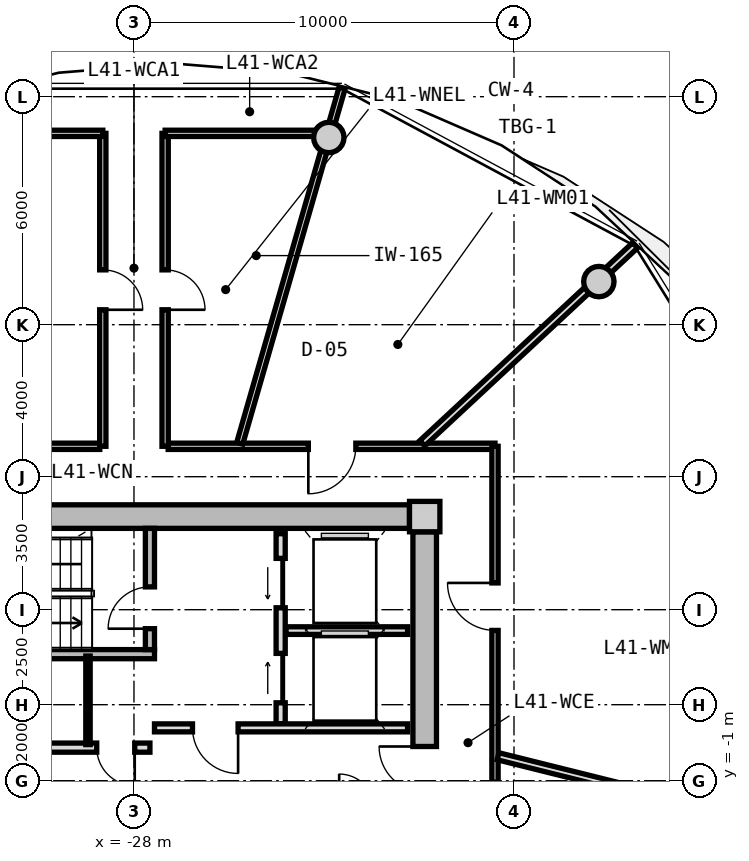
"""IFC4 building model, lengths in metres.
Left out: names, types, materials, properties, quantities, classifications, styles, units other than length and angle.
Written with IfcOpenShell. Run it as: python <this file> out.ifc"""

import sys

from ifc_helpers import new_model, si_unit, direction, frame, frame_2d, origin, origin_2d, place, context, subcontext, project, spatial, rectangle, circle, extrude, source, transform, mapped, element, fill, save


model = new_model("IFC4")
c1 = context("Model", 3, precision=1e-05, world=origin(), true_north=direction((0.0, 1.0)))
c2 = subcontext(c1, "Body", "Model", "MODEL_VIEW")
j1 = project(units=[si_unit("LENGTHUNIT", "METRE"), si_unit("PLANEANGLEUNIT", "RADIAN")], contexts=[c1])
p1 = place(None, origin())
s1 = spatial("IfcSite", under=j1, at=p1, CompositionType="ELEMENT")
p2 = place(p1, origin())
s2 = spatial("IfcBuilding", under=s1, at=p2, CompositionType="ELEMENT")
p3 = place(p2, frame((0.0, 0.0, 134.3)))
s3 = spatial("IfcBuildingStorey", under=s2, at=p3, CompositionType="ELEMENT", Elevation=134.3)
m1 = source(origin(), c2, "Body", "SweptSolid", [
    extrude(rectangle(XDim=0.8, YDim=0.8, at=origin_2d()), origin(), (0.0, 0.0, 1.0), 3.05),
])
p4 = place(p3, frame((-20.35, 5.95, 0.0), z_axis=(0.0, 0.0, 1.0), x_axis=(1.0, 0.0, 0.0)))
e1 = element("IfcColumn", 1, at=p4, inside=s3, PredefinedType="COLUMN", context=c2, shape_type="MappedRepresentation", body=[
    mapped(m1, transform((0.0, 0.0, 0.0), x_axis=(1.0, 0.0, 0.0), y_axis=(0.0, 1.0, 0.0), z_axis=(0.0, 0.0, 1.0), scale=1.0)),
])
m2 = source(origin(), c2, "Body", "SweptSolid", [
    extrude(rectangle(XDim=14.5, YDim=0.62, at=frame_2d((7.25, 0.0))), origin(), (0.0, 0.0, 1.0), 2.81),
])
p5 = place(p3, frame((-35.25, 5.95, 0.0), z_axis=(0.0, 0.0, 1.0), x_axis=(1.0, 0.0, 0.0)))
e2 = element("IfcWall", 2, at=p5, inside=s3, PredefinedType="SHEAR", context=c2, shape_type="MappedRepresentation", body=[
    mapped(m2, transform((0.0, 0.0, 0.0), x_axis=(1.0, 0.0, 0.0), y_axis=(0.0, 1.0, 0.0), z_axis=(0.0, 0.0, 1.0), scale=1.0)),
])
m3 = source(origin(), c2, "Body", "SweptSolid", [
    extrude(rectangle(XDim=11.1, YDim=0.62, at=frame_2d((5.55, 0.0))), origin(), (0.0, 0.0, 1.0), 2.81),
])
p6 = place(p3, frame((-20.35, 5.55, 0.0), z_axis=(0.0, 0.0, 1.0), x_axis=(0.0, -1.0, 0.0)))
e3 = element("IfcWall", 3, at=p6, inside=s3, PredefinedType="SHEAR", context=c2, shape_type="MappedRepresentation", body=[
    mapped(m3, transform((0.0, 0.0, 0.0), x_axis=(1.0, 0.0, 0.0), y_axis=(0.0, 1.0, 0.0), z_axis=(0.0, 0.0, 1.0), scale=1.0)),
])
p7 = place(p6, frame((5.65, 0.0, 0.0)))
e4 = element("IfcOpeningElement", 4, at=p7, cuts=e3, PredefinedType="OPENING", context=c2, shape_type="SweptSolid", body=[
    extrude(rectangle(XDim=1.2, YDim=2.15, at=frame_2d((0.6, 1.075))), frame((0.0, 0.32, 0.0), z_axis=(0.0, -1.0, 0.0), x_axis=(1.0, 0.0, 0.0)), (0.0, 0.0, 1.0), 0.64),
])
p8 = place(p6, frame((9.3, 0.0, 0.0)))
e5 = element("IfcOpeningElement", 5, at=p8, cuts=e3, PredefinedType="OPENING", context=c2, shape_type="SweptSolid", body=[
    extrude(rectangle(XDim=1.0, YDim=2.1, at=frame_2d((0.5, 1.05))), frame((0.0, 0.32, 0.0), z_axis=(0.0, -1.0, 0.0), x_axis=(1.0, 0.0, 0.0)), (0.0, 0.0, 1.0), 0.64),
])
m4 = source(origin(), c2, "Body", "SweptSolid", [
    extrude(circle(Radius=0.4, at=origin_2d()), origin(), (0.0, 0.0, 1.0), 3.47),
])
for number, where, z_axis, x_axis in (
    (6, (-15.767, 12.135, -0.42), (0.0, 0.0, 1.0), (1.0, 0.0, 0.0)),
    (7, (-22.873, 15.926, -0.42), (0.0, 0.0, 1.0), (1.0, 0.0, 0.0)),
):
    element("IfcColumn", number, at=place(p3, frame(where, z_axis=z_axis, x_axis=x_axis)), inside=s3, PredefinedType="COLUMN", context=c2, shape_type="MappedRepresentation", body=[
        mapped(m4, transform((0.0, 0.0, 0.0), x_axis=(1.0, 0.0, 0.0), y_axis=(0.0, 1.0, 0.0), z_axis=(0.0, 0.0, 1.0), scale=1.0)),
    ])
m5 = source(origin(), c2, "Body", "SweptSolid", [
    extrude(rectangle(XDim=7.88, YDim=0.24, at=frame_2d((3.94, 0.0))), origin(), (0.0, 0.0, 1.0), 2.81),
])
p9 = place(p3, frame((-35.34, 2.33, 0.0), z_axis=(0.0, 0.0, 1.0), x_axis=(1.0, 0.0, 0.0)))
e8 = element("IfcWall", 8, at=p9, inside=s3, PredefinedType="PARTITIONING", context=c2, shape_type="MappedRepresentation", body=[
    mapped(m5, transform((0.0, 0.0, 0.0), x_axis=(1.0, 0.0, 0.0), y_axis=(0.0, 1.0, 0.0), z_axis=(0.0, 0.0, 1.0), scale=1.0)),
])
m6 = source(origin(), c2, "Body", "SweptSolid", [
    extrude(rectangle(XDim=3.19, YDim=0.24, at=frame_2d((1.595, 0.0))), origin(), (0.0, 0.0, 1.0), 2.81),
])
p10 = place(p3, frame((-27.58, 2.45, 0.0), z_axis=(0.0, 0.0, 1.0), x_axis=(0.0, 1.0, 0.0)))
e9 = element("IfcWall", 9, at=p10, inside=s3, PredefinedType="PARTITIONING", context=c2, shape_type="MappedRepresentation", body=[
    mapped(m6, transform((0.0, 0.0, 0.0), x_axis=(1.0, 0.0, 0.0), y_axis=(0.0, 1.0, 0.0), z_axis=(0.0, 0.0, 1.0), scale=1.0)),
])
p11 = place(p10, frame((0.55, 0.0, 0.0)))
e10 = element("IfcOpeningElement", 10, at=p11, cuts=e9, PredefinedType="OPENING", context=c2, shape_type="SweptSolid", body=[
    extrude(rectangle(XDim=1.1, YDim=2.15, at=frame_2d((0.55, 1.075))), frame((0.0, 0.13, 0.0), z_axis=(0.0, -1.0, 0.0), x_axis=(1.0, 0.0, 0.0)), (0.0, 0.0, 1.0), 0.26),
])
m7 = source(origin(), c2, "Body", "SweptSolid", [
    extrude(rectangle(XDim=5.0, YDim=0.24, at=frame_2d((2.5, 0.0))), origin(), (0.0, 0.0, 1.0), 2.795),
])
p12 = place(p3, frame((-24.14, 0.5, 0.0), z_axis=(0.0, 0.0, 1.0), x_axis=(0.0, 1.0, 0.0)))
e11 = element("IfcWall", 11, at=p12, inside=s3, PredefinedType="PARTITIONING", context=c2, shape_type="MappedRepresentation", body=[
    mapped(m7, transform((0.0, 0.0, 0.0), x_axis=(1.0, 0.0, 0.0), y_axis=(0.0, 1.0, 0.0), z_axis=(0.0, 0.0, 1.0), scale=1.0)),
])
p13 = place(p12, frame((3.05, 0.0, 0.0)))
e12 = element("IfcOpeningElement", 12, at=p13, cuts=e11, PredefinedType="OPENING", context=c2, shape_type="SweptSolid", body=[
    extrude(rectangle(XDim=1.3, YDim=2.2, at=frame_2d((0.65, 1.1))), frame((0.0, 0.13, 0.0), z_axis=(0.0, -1.0, 0.0), x_axis=(1.0, 0.0, 0.0)), (0.0, 0.0, 1.0), 0.26),
])
p14 = place(p12, frame((0.55, 0.0, 0.0)))
e13 = element("IfcOpeningElement", 13, at=p14, cuts=e11, PredefinedType="OPENING", context=c2, shape_type="SweptSolid", body=[
    extrude(rectangle(XDim=1.3, YDim=2.2, at=frame_2d((0.65, 1.1))), frame((0.0, 0.13, 0.0), z_axis=(0.0, -1.0, 0.0), x_axis=(1.0, 0.0, 0.0)), (0.0, 0.0, 1.0), 0.26),
])
m8 = source(origin(), c2, "Body", "SweptSolid", [
    extrude(rectangle(XDim=3.2, YDim=0.2, at=frame_2d((1.6, 0.0))), origin(), (0.0, 0.0, 1.0), 2.795),
])
p15 = place(p3, frame((-24.0, 2.95, 0.0), z_axis=(0.0, 0.0, 1.0), x_axis=(1.0, 0.0, 0.0)))
e14 = element("IfcWall", 14, at=p15, inside=s3, PredefinedType="PARTITIONING", context=c2, shape_type="MappedRepresentation", body=[
    mapped(m8, transform((0.0, 0.0, 0.0), x_axis=(1.0, 0.0, 0.0), y_axis=(0.0, 1.0, 0.0), z_axis=(0.0, 0.0, 1.0), scale=1.0)),
])
m9 = source(origin(), c2, "Body", "SweptSolid", [
    extrude(rectangle(XDim=6.66, YDim=0.21, at=frame_2d((3.33, 0.0))), origin(), (0.0, 0.0, 1.0), 2.795),
])
p16 = place(p3, frame((-27.46, 0.39, 0.0), z_axis=(0.0, 0.0, 1.0), x_axis=(1.0, 0.0, 0.0)))
e15 = element("IfcWall", 15, at=p16, inside=s3, PredefinedType="PARTITIONING", context=c2, shape_type="MappedRepresentation", body=[
    mapped(m9, transform((0.0, 0.0, 0.0), x_axis=(1.0, 0.0, 0.0), y_axis=(0.0, 1.0, 0.0), z_axis=(0.0, 0.0, 1.0), scale=1.0)),
])
p17 = place(p16, frame((1.0, 0.0, 0.0)))
e16 = element("IfcOpeningElement", 16, at=p17, cuts=e15, PredefinedType="OPENING", context=c2, shape_type="SweptSolid", body=[
    extrude(rectangle(XDim=1.2, YDim=2.15, at=frame_2d((0.6, 1.075))), frame((0.0, 0.115, 0.0), z_axis=(0.0, -1.0, 0.0), x_axis=(1.0, 0.0, 0.0)), (0.0, 0.0, 1.0), 0.23),
])
m10 = source(origin(), c2, "Body", "SweptSolid", [
    extrude(rectangle(XDim=7.62, YDim=0.24, at=frame_2d((3.81, 0.0))), origin(), (0.0, 0.0, 1.0), 2.795),
])
p18 = place(p3, frame((-35.2, -0.13, 0.0), z_axis=(0.0, 0.0, 1.0), x_axis=(1.0, 0.0, 0.0)))
e17 = element("IfcWall", 17, at=p18, inside=s3, PredefinedType="PARTITIONING", context=c2, shape_type="MappedRepresentation", body=[
    mapped(m10, transform((0.0, 0.0, 0.0), x_axis=(1.0, 0.0, 0.0), y_axis=(0.0, 1.0, 0.0), z_axis=(0.0, 0.0, 1.0), scale=1.0)),
])
p19 = place(p18, frame((6.22, 0.0, 0.0)))
e18 = element("IfcOpeningElement", 18, at=p19, cuts=e17, PredefinedType="OPENING", context=c2, shape_type="SweptSolid", body=[
    extrude(rectangle(XDim=1.0, YDim=2.1, at=frame_2d((0.5, 1.05))), frame((0.0, 0.13, 0.0), z_axis=(0.0, -1.0, 0.0), x_axis=(1.0, 0.0, 0.0)), (0.0, 0.0, 1.0), 0.26),
])
p20 = place(p18, frame((2.4, 0.0, 0.0)))
e19 = element("IfcOpeningElement", 19, at=p20, cuts=e17, PredefinedType="OPENING", context=c2, shape_type="SweptSolid", body=[
    extrude(rectangle(XDim=1.0, YDim=2.1, at=frame_2d((0.5, 1.05))), frame((0.0, 0.13, 0.0), z_axis=(0.0, -1.0, 0.0), x_axis=(1.0, 0.0, 0.0)), (0.0, 0.0, 1.0), 0.26),
])
m11 = source(origin(), c2, "Body", "SweptSolid", [
    extrude(rectangle(XDim=2.33, YDim=0.115, at=frame_2d((1.165, 0.0))), origin(), (0.0, 0.0, 1.0), 2.795),
])
p21 = place(p3, frame((-29.21, -0.05, 0.0), z_axis=(0.0, 0.0, 1.0), x_axis=(0.0, 1.0, 0.0)))
e20 = element("IfcWall", 20, at=p21, inside=s3, PredefinedType="PARTITIONING", context=c2, shape_type="MappedRepresentation", body=[
    mapped(m11, transform((0.0, 0.0, 0.0), x_axis=(1.0, 0.0, 0.0), y_axis=(0.0, 1.0, 0.0), z_axis=(0.0, 0.0, 1.0), scale=1.0)),
])
m12 = source(origin(), c2, "Body", "SweptSolid", [
    extrude(rectangle(XDim=8.6, YDim=0.165, at=frame_2d((4.3, 0.0))), origin(), (0.0, 0.0, 1.0), 2.795),
])
p22 = place(p3, frame((-37.5, 7.8, 0.0), z_axis=(0.0, 0.0, 1.0), x_axis=(1.0, 0.0, 0.0)))
e21 = element("IfcWall", 21, at=p22, inside=s3, PredefinedType="PARTITIONING", context=c2, shape_type="MappedRepresentation", body=[
    mapped(m12, transform((0.0, 0.0, 0.0), x_axis=(1.0, 0.0, 0.0), y_axis=(0.0, 1.0, 0.0), z_axis=(0.0, 0.0, 1.0), scale=1.0)),
])
p23 = place(p22, frame((1.471, 0.0, 0.0)))
e22 = element("IfcOpeningElement", 22, at=p23, cuts=e21, PredefinedType="OPENING", context=c2, shape_type="SweptSolid", body=[
    extrude(rectangle(XDim=1.25, YDim=2.2, at=frame_2d((0.625, 1.1))), frame((0.0, 0.093, 0.0), z_axis=(0.0, -1.0, 0.0), x_axis=(1.0, 0.0, 0.0)), (0.0, 0.0, 1.0), 0.185),
])
p24 = place(p3, frame((-27.1, 7.8, 0.0), z_axis=(0.0, 0.0, 1.0), x_axis=(1.0, 0.0, 0.0)))
e23 = element("IfcWall", 23, at=p24, inside=s3, PredefinedType="PARTITIONING", context=c2, shape_type="MappedRepresentation", body=[
    mapped(m12, transform((0.0, 0.0, 0.0), x_axis=(1.0, 0.0, 0.0), y_axis=(0.0, 1.0, 0.0), z_axis=(0.0, 0.0, 1.0), scale=1.0)),
])
p25 = place(p24, frame((3.688, 0.0, 0.0)))
e24 = element("IfcOpeningElement", 24, at=p25, cuts=e23, PredefinedType="OPENING", context=c2, shape_type="SweptSolid", body=[
    extrude(rectangle(XDim=1.25, YDim=2.2, at=frame_2d((0.625, 1.1))), frame((0.0, 0.093, 0.0), z_axis=(0.0, -1.0, 0.0), x_axis=(1.0, 0.0, 0.0)), (0.0, 0.0, 1.0), 0.185),
])
m13 = source(origin(), c2, "Body", "SweptSolid", [
    extrude(rectangle(XDim=15.6, YDim=0.165, at=frame_2d((7.8, 0.0))), origin(), (0.0, 0.0, 1.0), 2.795),
])
p26 = place(p3, frame((-18.5, 7.8, 0.0), z_axis=(0.0, 0.0, 1.0), x_axis=(0.0, -1.0, 0.0)))
e25 = element("IfcWall", 25, at=p26, inside=s3, PredefinedType="PARTITIONING", context=c2, shape_type="MappedRepresentation", body=[
    mapped(m13, transform((0.0, 0.0, 0.0), x_axis=(1.0, 0.0, 0.0), y_axis=(0.0, 1.0, 0.0), z_axis=(0.0, 0.0, 1.0), scale=1.0)),
])
p27 = place(p26, frame((10.881, 0.0, 0.0)))
e26 = element("IfcOpeningElement", 26, at=p27, cuts=e25, PredefinedType="OPENING", context=c2, shape_type="SweptSolid", body=[
    extrude(rectangle(XDim=1.05, YDim=2.15, at=frame_2d((0.525, 1.075))), frame((0.0, 0.093, 0.0), z_axis=(0.0, -1.0, 0.0), x_axis=(1.0, 0.0, 0.0)), (0.0, 0.0, 1.0), 0.185),
])
p28 = place(p26, frame((8.844, 0.0, 0.0)))
e27 = element("IfcOpeningElement", 27, at=p28, cuts=e25, PredefinedType="OPENING", context=c2, shape_type="SweptSolid", body=[
    extrude(rectangle(XDim=1.05, YDim=2.15, at=frame_2d((0.525, 1.075))), frame((0.0, 0.093, 0.0), z_axis=(0.0, -1.0, 0.0), x_axis=(1.0, 0.0, 0.0)), (0.0, 0.0, 1.0), 0.185),
])
p29 = place(p26, frame((3.596, 0.0, 0.0)))
e28 = element("IfcOpeningElement", 28, at=p29, cuts=e25, PredefinedType="OPENING", context=c2, shape_type="SweptSolid", body=[
    extrude(rectangle(XDim=1.25, YDim=2.2, at=frame_2d((0.625, 1.1))), frame((0.0, 0.093, 0.0), z_axis=(0.0, -1.0, 0.0), x_axis=(1.0, 0.0, 0.0)), (0.0, 0.0, 1.0), 0.185),
])
m14 = source(origin(), c2, "Body", "SweptSolid", [
    extrude(rectangle(XDim=9.73, YDim=0.165, at=frame_2d((4.865, 0.0))), origin(), (0.0, 0.0, 1.0), 2.345),
])
p30 = place(p3, frame((-25.217, 7.88, 0.0), z_axis=(0.0, 0.0, 1.0), x_axis=(0.27679492614, 0.960929013436, 0.0)))
e29 = element("IfcWall", 29, at=p30, inside=s3, PredefinedType="PARTITIONING", context=c2, shape_type="MappedRepresentation", body=[
    mapped(m14, transform((0.0, 0.0, 0.0), x_axis=(1.0, 0.0, 0.0), y_axis=(0.0, 1.0, 0.0), z_axis=(0.0, 0.0, 1.0), scale=1.0)),
])
m15 = source(origin(), c2, "Body", "SweptSolid", [
    extrude(rectangle(XDim=8.235, YDim=0.165, at=frame_2d((4.118, 0.0))), origin(), (0.0, 0.0, 1.0), 2.795),
])
p31 = place(p3, frame((-28.82, 7.8, 0.0), z_axis=(0.0, 0.0, 1.0), x_axis=(0.0, 1.0, 0.0)))
e30 = element("IfcWall", 30, at=p31, inside=s3, PredefinedType="PARTITIONING", context=c2, shape_type="MappedRepresentation", body=[
    mapped(m15, transform((0.0, 0.0, 0.0), x_axis=(1.0, 0.0, 0.0), y_axis=(0.0, 1.0, 0.0), z_axis=(0.0, 0.0, 1.0), scale=1.0)),
])
p32 = place(p31, frame((3.593, 0.0, 0.0)))
e31 = element("IfcOpeningElement", 31, at=p32, cuts=e30, PredefinedType="OPENING", context=c2, shape_type="SweptSolid", body=[
    extrude(rectangle(XDim=1.05, YDim=2.15, at=frame_2d((0.525, 1.075))), frame((0.0, 0.093, 0.0), z_axis=(0.0, -1.0, 0.0), x_axis=(1.0, 0.0, 0.0)), (0.0, 0.0, 1.0), 0.185),
])
m16 = source(origin(), c2, "Body", "SweptSolid", [
    extrude(rectangle(XDim=5.089, YDim=0.165, at=frame_2d((2.544, 0.0))), origin(), (0.0, 0.0, 1.0), 2.345),
])
p33 = place(p3, frame((-33.909, 16.035, 0.0), z_axis=(0.0, 0.0, 1.0), x_axis=(1.0, 0.0, 0.0)))
e32 = element("IfcWall", 32, at=p33, inside=s3, PredefinedType="PARTITIONING", context=c2, shape_type="MappedRepresentation", body=[
    mapped(m16, transform((0.0, 0.0, 0.0), x_axis=(1.0, 0.0, 0.0), y_axis=(0.0, 1.0, 0.0), z_axis=(0.0, 0.0, 1.0), scale=1.0)),
])
p34 = place(p3, frame((-27.18, 7.8, 0.0), z_axis=(0.0, 0.0, 1.0), x_axis=(0.0, 1.0, 0.0)))
e33 = element("IfcWall", 33, at=p34, inside=s3, PredefinedType="PARTITIONING", context=c2, shape_type="MappedRepresentation", body=[
    mapped(m15, transform((0.0, 0.0, 0.0), x_axis=(1.0, 0.0, 0.0), y_axis=(0.0, 1.0, 0.0), z_axis=(0.0, 0.0, 1.0), scale=1.0)),
])
p35 = place(p34, frame((3.593, 0.0, 0.0)))
e34 = element("IfcOpeningElement", 34, at=p35, cuts=e33, PredefinedType="OPENING", context=c2, shape_type="SweptSolid", body=[
    extrude(rectangle(XDim=1.05, YDim=2.15, at=frame_2d((0.525, 1.075))), frame((0.0, 0.093, 0.0), z_axis=(0.0, -1.0, 0.0), x_axis=(1.0, 0.0, 0.0)), (0.0, 0.0, 1.0), 0.185),
])
m17 = source(origin(), c2, "Body", "SweptSolid", [
    extrude(rectangle(XDim=4.469, YDim=0.165, at=frame_2d((2.234, 0.0))), origin(), (0.0, 0.0, 1.0), 2.345),
])
p36 = place(p3, frame((-27.18, 16.035, 0.0), z_axis=(0.0, 0.0, 1.0), x_axis=(1.0, 0.0, 0.0)))
e35 = element("IfcWall", 35, at=p36, inside=s3, PredefinedType="PARTITIONING", context=c2, shape_type="MappedRepresentation", body=[
    mapped(m17, transform((0.0, 0.0, 0.0), x_axis=(1.0, 0.0, 0.0), y_axis=(0.0, 1.0, 0.0), z_axis=(0.0, 0.0, 1.0), scale=1.0)),
])
m18 = source(origin(), c2, "Body", "SweptSolid", [
    extrude(rectangle(XDim=8.305, YDim=0.19, at=frame_2d((4.153, 0.0))), origin(), (0.0, 0.0, 1.0), 2.345),
])
p37 = place(p3, frame((-18.42, -0.357, 0.0), z_axis=(0.0, 0.0, 1.0), x_axis=(0.970309994378, -0.241864662175, 0.0)))
e36 = element("IfcWall", 36, at=p37, inside=s3, PredefinedType="PARTITIONING", context=c2, shape_type="MappedRepresentation", body=[
    mapped(m18, transform((0.0, 0.0, 0.0), x_axis=(1.0, 0.0, 0.0), y_axis=(0.0, 1.0, 0.0), z_axis=(0.0, 0.0, 1.0), scale=1.0)),
])
m19 = source(origin(), c2, "Body", "SweptSolid", [
    extrude(rectangle(XDim=7.648, YDim=0.19, at=frame_2d((3.824, 0.0))), origin(), (0.0, 0.0, 1.0), 2.345),
])
p38 = place(p3, frame((-20.413, 7.88, 0.0), z_axis=(0.0, 0.0, 1.0), x_axis=(0.732182665826, 0.681108320213, 0.0)))
e37 = element("IfcWall", 37, at=p38, inside=s3, PredefinedType="PARTITIONING", context=c2, shape_type="MappedRepresentation", body=[
    mapped(m19, transform((0.0, 0.0, 0.0), x_axis=(1.0, 0.0, 0.0), y_axis=(0.0, 1.0, 0.0), z_axis=(0.0, 0.0, 1.0), scale=1.0)),
])
m20 = source(origin(), c2, "Body", "SweptSolid", [
    extrude(rectangle(XDim=1.1, YDim=2.15, at=frame_2d((0.55, 1.075))), frame((0.0, 0.025, 0.0), z_axis=(0.0, -1.0, 0.0), x_axis=(1.0, 0.0, 0.0)), (0.0, 0.0, 1.0), 0.05),
])
p39 = place(p11, origin())
e38 = element("IfcDoor", 38, at=p39, inside=s3, OperationType="SINGLE_SWING_LEFT", PredefinedType="DOOR", context=c2, shape_type="MappedRepresentation", body=[
    mapped(m20, transform((0.0, 0.0, 0.0), x_axis=(1.0, 0.0, 0.0), y_axis=(0.0, 1.0, 0.0), z_axis=(0.0, 0.0, 1.0), scale=1.0)),
])
fill(e10, e38)
m21 = source(origin(), c2, "Body", "SweptSolid", [
    extrude(rectangle(XDim=1.3, YDim=2.2, at=frame_2d((0.65, 1.1))), frame((0.0, 0.025, 0.0), z_axis=(0.0, -1.0, 0.0), x_axis=(1.0, 0.0, 0.0)), (0.0, 0.0, 1.0), 0.05),
])
p40 = place(p13, origin())
e39 = element("IfcDoor", 39, at=p40, inside=s3, OperationType="SLIDING_TO_LEFT", PredefinedType="DOOR", context=c2, shape_type="MappedRepresentation", body=[
    mapped(m21, transform((0.0, 0.0, 0.0), x_axis=(1.0, 0.0, 0.0), y_axis=(0.0, 1.0, 0.0), z_axis=(0.0, 0.0, 1.0), scale=1.0)),
])
fill(e12, e39)
p41 = place(p14, origin())
e40 = element("IfcDoor", 40, at=p41, inside=s3, OperationType="SLIDING_TO_RIGHT", PredefinedType="DOOR", context=c2, shape_type="MappedRepresentation", body=[
    mapped(m21, transform((0.0, 0.0, 0.0), x_axis=(1.0, 0.0, 0.0), y_axis=(0.0, 1.0, 0.0), z_axis=(0.0, 0.0, 1.0), scale=1.0)),
])
fill(e13, e40)
m22 = source(origin(), c2, "Body", "SweptSolid", [
    extrude(rectangle(XDim=1.2, YDim=2.15, at=frame_2d((0.6, 1.075))), frame((0.0, 0.025, 0.0), z_axis=(0.0, -1.0, 0.0), x_axis=(1.0, 0.0, 0.0)), (0.0, 0.0, 1.0), 0.05),
])
p42 = place(p17, frame((1.2, 0.0, 0.0), z_axis=(0.0, 0.0, 1.0), x_axis=(-1.0, 0.0, 0.0)))
e41 = element("IfcDoor", 41, at=p42, inside=s3, OperationType="SINGLE_SWING_LEFT", PredefinedType="DOOR", context=c2, shape_type="MappedRepresentation", body=[
    mapped(m22, transform((0.0, 0.0, 0.0), x_axis=(1.0, 0.0, 0.0), y_axis=(0.0, 1.0, 0.0), z_axis=(0.0, 0.0, 1.0), scale=1.0)),
])
fill(e16, e41)
p43 = place(p7, frame((1.2, 0.0, 0.0), z_axis=(0.0, 0.0, 1.0), x_axis=(-1.0, 0.0, 0.0)))
e42 = element("IfcDoor", 42, at=p43, inside=s3, OperationType="SINGLE_SWING_RIGHT", PredefinedType="DOOR", context=c2, shape_type="MappedRepresentation", body=[
    mapped(m22, transform((0.0, 0.0, 0.0), x_axis=(1.0, 0.0, 0.0), y_axis=(0.0, 1.0, 0.0), z_axis=(0.0, 0.0, 1.0), scale=1.0)),
])
fill(e4, e42)
m23 = source(origin(), c2, "Body", "SweptSolid", [
    extrude(rectangle(XDim=1.0, YDim=2.1, at=frame_2d((0.5, 1.05))), frame((0.0, 0.025, 0.0), z_axis=(0.0, -1.0, 0.0), x_axis=(1.0, 0.0, 0.0)), (0.0, 0.0, 1.0), 0.05),
])
p44 = place(p19, frame((1.0, 0.0, 0.0), z_axis=(0.0, 0.0, 1.0), x_axis=(-1.0, 0.0, 0.0)))
e43 = element("IfcDoor", 43, at=p44, inside=s3, OperationType="SINGLE_SWING_LEFT", PredefinedType="DOOR", context=c2, shape_type="MappedRepresentation", body=[
    mapped(m23, transform((0.0, 0.0, 0.0), x_axis=(1.0, 0.0, 0.0), y_axis=(0.0, 1.0, 0.0), z_axis=(0.0, 0.0, 1.0), scale=1.0)),
])
fill(e18, e43)
m24 = source(origin(), c2, "Body", "SweptSolid", [
    extrude(rectangle(XDim=1.05, YDim=2.15, at=frame_2d((0.525, 1.075))), frame((0.0, 0.025, 0.0), z_axis=(0.0, -1.0, 0.0), x_axis=(1.0, 0.0, 0.0)), (0.0, 0.0, 1.0), 0.05),
])
p45 = place(p32, frame((1.05, 0.0, 0.0), z_axis=(0.0, 0.0, 1.0), x_axis=(-1.0, 0.0, 0.0)))
e44 = element("IfcDoor", 44, at=p45, inside=s3, OperationType="SINGLE_SWING_RIGHT", PredefinedType="DOOR", context=c2, shape_type="MappedRepresentation", body=[
    mapped(m24, transform((0.0, 0.0, 0.0), x_axis=(1.0, 0.0, 0.0), y_axis=(0.0, 1.0, 0.0), z_axis=(0.0, 0.0, 1.0), scale=1.0)),
])
fill(e31, e44)
p46 = place(p35, frame((1.05, 0.0, 0.0), z_axis=(0.0, 0.0, 1.0), x_axis=(-1.0, 0.0, 0.0)))
e45 = element("IfcDoor", 45, at=p46, inside=s3, OperationType="SINGLE_SWING_RIGHT", PredefinedType="DOOR", context=c2, shape_type="MappedRepresentation", body=[
    mapped(m24, transform((0.0, 0.0, 0.0), x_axis=(1.0, 0.0, 0.0), y_axis=(0.0, 1.0, 0.0), z_axis=(0.0, 0.0, 1.0), scale=1.0)),
])
fill(e34, e45)
m25 = source(origin(), c2, "Body", "SweptSolid", [
    extrude(rectangle(XDim=1.25, YDim=2.2, at=frame_2d((0.625, 1.1))), frame((0.0, 0.025, 0.0), z_axis=(0.0, -1.0, 0.0), x_axis=(1.0, 0.0, 0.0)), (0.0, 0.0, 1.0), 0.05),
])
p47 = place(p29, frame((1.25, 0.0, 0.0), z_axis=(0.0, 0.0, 1.0), x_axis=(-1.0, 0.0, 0.0)))
e46 = element("IfcDoor", 46, at=p47, inside=s3, OperationType="SINGLE_SWING_RIGHT", PredefinedType="DOOR", context=c2, shape_type="MappedRepresentation", body=[
    mapped(m25, transform((0.0, 0.0, 0.0), x_axis=(1.0, 0.0, 0.0), y_axis=(0.0, 1.0, 0.0), z_axis=(0.0, 0.0, 1.0), scale=1.0)),
])
fill(e28, e46)
p48 = place(p25, frame((1.25, 0.0, 0.0), z_axis=(0.0, 0.0, 1.0), x_axis=(-1.0, 0.0, 0.0)))
e47 = element("IfcDoor", 47, at=p48, inside=s3, OperationType="SINGLE_SWING_RIGHT", PredefinedType="DOOR", context=c2, shape_type="MappedRepresentation", body=[
    mapped(m25, transform((0.0, 0.0, 0.0), x_axis=(1.0, 0.0, 0.0), y_axis=(0.0, 1.0, 0.0), z_axis=(0.0, 0.0, 1.0), scale=1.0)),
])
fill(e24, e47)
save(model, sys.argv[1])
